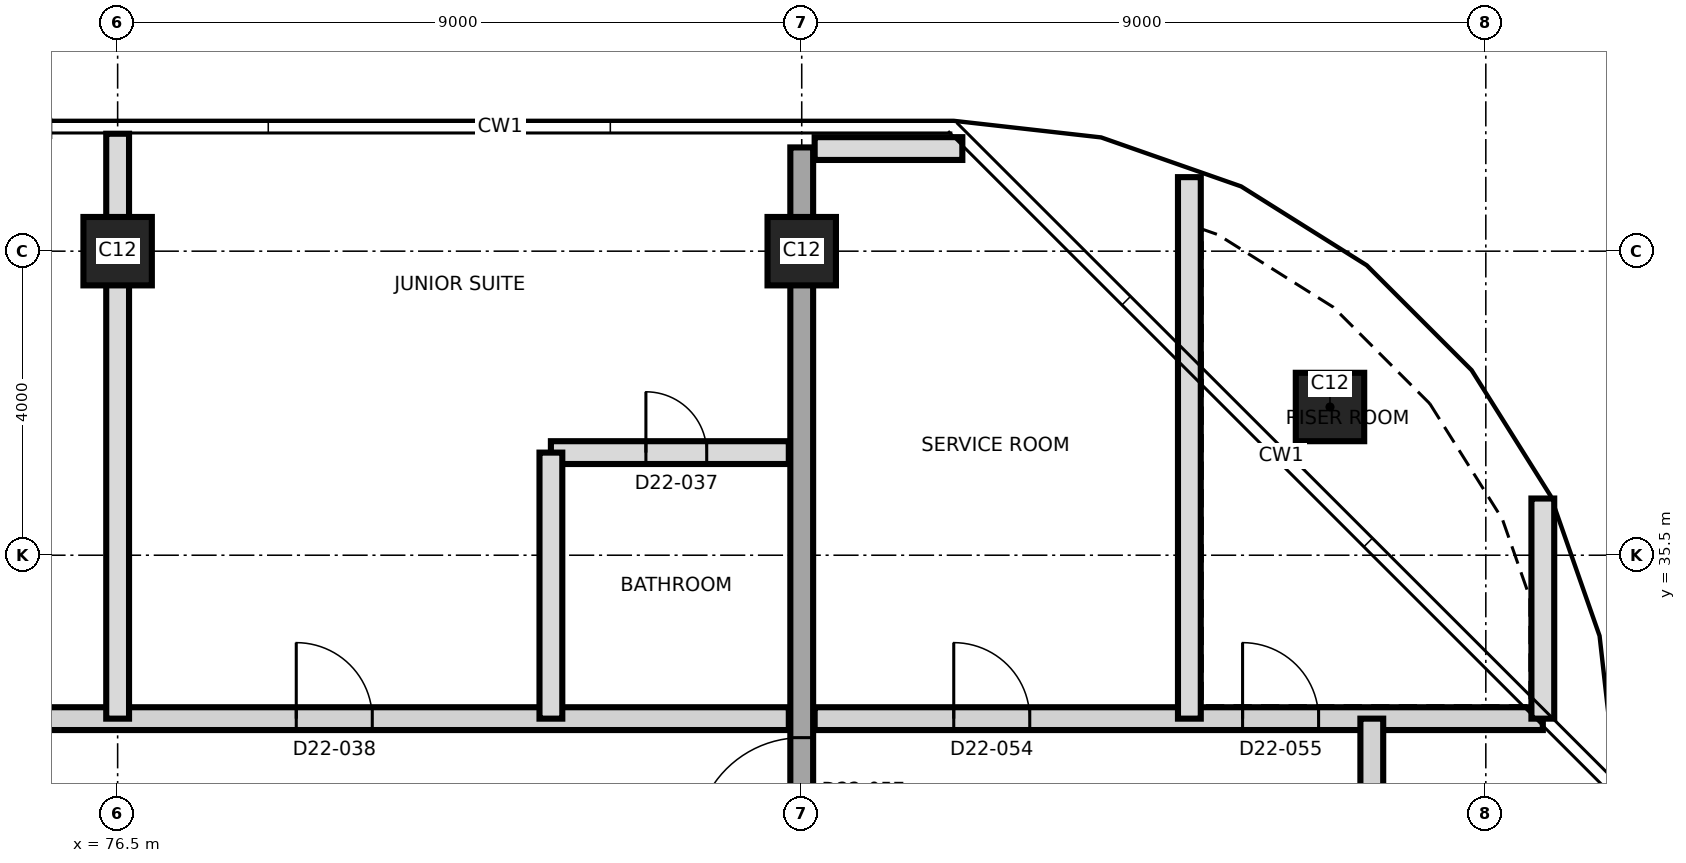
"""IFC4 building model, lengths in metres.
Left out: names, types, materials, properties, quantities, classifications, styles, units other than length and angle.
Written with IfcOpenShell. Run it as: python <this file> out.ifc"""

import sys

from ifc_helpers import new_model, si_unit, direction, frame, frame_2d, origin, origin_2d, place, context, subcontext, project, spatial, rectangle, extrude, element, fill, save


model = new_model("IFC4")
c1 = context("Model", 3, precision=1e-05, world=origin(), true_north=direction((0.0, 1.0)))
c2 = subcontext(c1, "Body", "Model", "MODEL_VIEW")
j1 = project(units=[si_unit("LENGTHUNIT", "METRE"), si_unit("PLANEANGLEUNIT", "RADIAN")], contexts=[c1])
p1 = place(None, origin())
s1 = spatial("IfcSite", under=j1, at=p1, CompositionType="ELEMENT")
p2 = place(p1, origin())
s2 = spatial("IfcBuilding", under=s1, at=p2, CompositionType="ELEMENT")
p3 = place(p2, frame((0.0, 0.0, 199.5)))
s3 = spatial("IfcBuildingStorey", under=s2, at=p3, CompositionType="ELEMENT", Elevation=199.5)
for number, where, z_axis, x_axis in (
    (1, (92.45, 37.45, 0.0), (0.0, 0.0, 1.0), (1.0, 0.0, 0.0)),
    (2, (76.5, 39.5, 0.0), (0.0, 0.0, 1.0), (1.0, 0.0, 0.0)),
    (3, (85.5, 39.5, 0.0), (0.0, 0.0, 1.0), (1.0, 0.0, 0.0)),
):
    element("IfcColumn", number, at=place(p3, frame(where, z_axis=z_axis, x_axis=x_axis)), inside=s3, PredefinedType="COLUMN", context=c2, shape_type="SweptSolid", body=[
        extrude(rectangle(XDim=0.9, YDim=0.9, at=origin_2d()), origin(), (0.0, 0.0, 1.0), 3.7),
    ])
p4 = place(p3, frame((85.5, 20.135, 0.0), z_axis=(0.0, 0.0, 1.0), x_axis=(0.0, 1.0, 0.0)))
e4 = element("IfcWall", 4, at=p4, inside=s3, PredefinedType="SHEAR", context=c2, shape_type="SweptSolid", body=[
    extrude(rectangle(XDim=20.73, YDim=0.3, at=frame_2d((10.365, 0.0))), origin(), (0.0, 0.0, 1.0), 3.7),
])
p5 = place(p4, frame((11.565, 0.0, 0.0)))
e5 = element("IfcOpeningElement", 5, at=p5, cuts=e4, PredefinedType="OPENING", context=c2, shape_type="SweptSolid", body=[
    extrude(rectangle(XDim=1.4, YDim=2.1, at=frame_2d((0.7, 1.05))), frame((0.0, 0.16, 0.0), z_axis=(0.0, -1.0, 0.0), x_axis=(1.0, 0.0, 0.0)), (0.0, 0.0, 1.0), 0.32),
])
p6 = place(p3, frame((58.55, 33.35, 0.0), z_axis=(0.0, 0.0, 1.0), x_axis=(1.0, 0.0, 0.0)))
e6 = element("IfcWall", 6, at=p6, inside=s3, PredefinedType="PARTITIONING", context=c2, shape_type="SweptSolid", body=[
    extrude(rectangle(XDim=26.78, YDim=0.3, at=frame_2d((13.39, 0.0))), origin(), (0.0, 0.0, 1.0), 3.4),
])
p7 = place(p6, frame((1.1, 0.0, 0.0)))
e7 = element("IfcOpeningElement", 7, at=p7, cuts=e6, PredefinedType="OPENING", context=c2, shape_type="SweptSolid", body=[
    extrude(rectangle(XDim=1.0, YDim=2.1, at=frame_2d((0.5, 1.05))), frame((0.0, 0.16, 0.0), z_axis=(0.0, -1.0, 0.0), x_axis=(1.0, 0.0, 0.0)), (0.0, 0.0, 1.0), 0.32),
])
p8 = place(p6, frame((6.95, 0.0, 0.0)))
e8 = element("IfcOpeningElement", 8, at=p8, cuts=e6, PredefinedType="OPENING", context=c2, shape_type="SweptSolid", body=[
    extrude(rectangle(XDim=1.0, YDim=2.1, at=frame_2d((0.5, 1.05))), frame((0.0, 0.16, 0.0), z_axis=(0.0, -1.0, 0.0), x_axis=(1.0, 0.0, 0.0)), (0.0, 0.0, 1.0), 0.32),
])
p9 = place(p6, frame((14.6, 0.0, 0.0)))
e9 = element("IfcOpeningElement", 9, at=p9, cuts=e6, PredefinedType="OPENING", context=c2, shape_type="SweptSolid", body=[
    extrude(rectangle(XDim=1.0, YDim=2.4, at=frame_2d((0.5, 1.2))), frame((0.0, 0.16, 0.0), z_axis=(0.0, -1.0, 0.0), x_axis=(1.0, 0.0, 0.0)), (0.0, 0.0, 1.0), 0.32),
])
p10 = place(p6, frame((20.3, 0.0, 0.0)))
e10 = element("IfcOpeningElement", 10, at=p10, cuts=e6, PredefinedType="OPENING", context=c2, shape_type="SweptSolid", body=[
    extrude(rectangle(XDim=1.0, YDim=2.4, at=frame_2d((0.5, 1.2))), frame((0.0, 0.16, 0.0), z_axis=(0.0, -1.0, 0.0), x_axis=(1.0, 0.0, 0.0)), (0.0, 0.0, 1.0), 0.32),
])
p11 = place(p3, frame((85.67, 33.35, 0.0), z_axis=(0.0, 0.0, 1.0), x_axis=(1.0, 0.0, 0.0)))
e11 = element("IfcWall", 11, at=p11, inside=s3, PredefinedType="PARTITIONING", context=c2, shape_type="SweptSolid", body=[
    extrude(rectangle(XDim=9.58, YDim=0.3, at=frame_2d((4.79, 0.0))), origin(), (0.0, 0.0, 1.0), 3.4),
])
p12 = place(p11, frame((1.83, 0.0, 0.0)))
e12 = element("IfcOpeningElement", 12, at=p12, cuts=e11, PredefinedType="OPENING", context=c2, shape_type="SweptSolid", body=[
    extrude(rectangle(XDim=1.0, YDim=2.1, at=frame_2d((0.5, 1.05))), frame((0.0, 0.16, 0.0), z_axis=(0.0, -1.0, 0.0), x_axis=(1.0, 0.0, 0.0)), (0.0, 0.0, 1.0), 0.32),
])
p13 = place(p11, frame((5.63, 0.0, 0.0)))
e13 = element("IfcOpeningElement", 13, at=p13, cuts=e11, PredefinedType="OPENING", context=c2, shape_type="SweptSolid", body=[
    extrude(rectangle(XDim=1.0, YDim=2.1, at=frame_2d((0.5, 1.05))), frame((0.0, 0.16, 0.0), z_axis=(0.0, -1.0, 0.0), x_axis=(1.0, 0.0, 0.0)), (0.0, 0.0, 1.0), 0.32),
])
p14 = place(p3, frame((82.2, 36.85, 0.0), z_axis=(0.0, 0.0, 1.0), x_axis=(1.0, 0.0, 0.0)))
e14 = element("IfcWall", 14, at=p14, inside=s3, PredefinedType="PARTITIONING", context=c2, shape_type="SweptSolid", body=[
    extrude(rectangle(XDim=3.13, YDim=0.3, at=frame_2d((1.565, 0.0))), origin(), (0.0, 0.0, 1.0), 3.4),
])
p15 = place(p14, frame((1.25, 0.0, 0.0)))
e15 = element("IfcOpeningElement", 15, at=p15, cuts=e14, PredefinedType="OPENING", context=c2, shape_type="SweptSolid", body=[
    extrude(rectangle(XDim=0.8, YDim=2.1, at=frame_2d((0.4, 1.05))), frame((0.0, 0.16, 0.0), z_axis=(0.0, -1.0, 0.0), x_axis=(1.0, 0.0, 0.0)), (0.0, 0.0, 1.0), 0.32),
])
p16 = place(p3, frame((85.67, 40.85, 0.0), z_axis=(0.0, 0.0, 1.0), x_axis=(1.0, 0.0, 0.0)))
e16 = element("IfcWall", 16, at=p16, inside=s3, PredefinedType="PARTITIONING", context=c2, shape_type="SweptSolid", body=[
    extrude(rectangle(XDim=1.943, YDim=0.3, at=frame_2d((0.972, 0.0))), origin(), (0.0, 0.0, 1.0), 3.4),
])
p17 = place(p3, frame((76.5, 33.35, 0.0), z_axis=(0.0, 0.0, 1.0), x_axis=(0.0, 1.0, 0.0)))
e17 = element("IfcWall", 17, at=p17, inside=s3, PredefinedType="PARTITIONING", context=c2, shape_type="SweptSolid", body=[
    extrude(rectangle(XDim=7.695, YDim=0.3, at=frame_2d((3.847, 0.0))), origin(), (0.0, 0.0, 1.0), 3.4),
])
p18 = place(p3, frame((82.2, 33.35, 0.0), z_axis=(0.0, 0.0, 1.0), x_axis=(0.0, 1.0, 0.0)))
e18 = element("IfcWall", 18, at=p18, inside=s3, PredefinedType="PARTITIONING", context=c2, shape_type="SweptSolid", body=[
    extrude(rectangle(XDim=3.5, YDim=0.3, at=frame_2d((1.75, 0.0))), origin(), (0.0, 0.0, 1.0), 3.4),
])
p19 = place(p3, frame((90.6, 33.35, 0.0), z_axis=(0.0, 0.0, 1.0), x_axis=(0.0, 1.0, 0.0)))
e19 = element("IfcWall", 19, at=p19, inside=s3, PredefinedType="PARTITIONING", context=c2, shape_type="SweptSolid", body=[
    extrude(rectangle(XDim=7.124, YDim=0.3, at=frame_2d((3.562, 0.0))), origin(), (0.0, 0.0, 1.0), 3.4),
])
p20 = place(p3, frame((93.0, 30.65, 0.0), z_axis=(0.0, 0.0, 1.0), x_axis=(0.0, 1.0, 0.0)))
e20 = element("IfcWall", 20, at=p20, inside=s3, PredefinedType="PARTITIONING", context=c2, shape_type="SweptSolid", body=[
    extrude(rectangle(XDim=2.7, YDim=0.3, at=frame_2d((1.35, 0.0))), origin(), (0.0, 0.0, 1.0), 3.4),
])
p21 = place(p3, frame((95.25, 33.35, 0.0), z_axis=(0.0, 0.0, 1.0), x_axis=(0.0, 1.0, 0.0)))
e21 = element("IfcWall", 21, at=p21, inside=s3, PredefinedType="PARTITIONING", context=c2, shape_type="SweptSolid", body=[
    extrude(rectangle(XDim=2.896, YDim=0.3, at=frame_2d((1.448, 0.0))), origin(), (0.0, 0.0, 1.0), 3.4),
])
p22 = place(p15, origin())
e22 = element("IfcDoor", 22, at=p22, inside=s3, OperationType="SINGLE_SWING_LEFT", PredefinedType="DOOR", context=c2, shape_type="SweptSolid", body=[
    extrude(rectangle(XDim=0.8, YDim=2.1, at=frame_2d((0.4, 1.05))), frame((0.0, 0.025, 0.0), z_axis=(0.0, -1.0, 0.0), x_axis=(1.0, 0.0, 0.0)), (0.0, 0.0, 1.0), 0.05),
])
fill(e15, e22)
p23 = place(p10, origin())
e23 = element("IfcDoor", 23, at=p23, inside=s3, OperationType="SINGLE_SWING_RIGHT", PredefinedType="DOOR", context=c2, shape_type="SweptSolid", body=[
    extrude(rectangle(XDim=1.0, YDim=2.4, at=frame_2d((0.5, 1.2))), frame((0.0, 0.025, 0.0), z_axis=(0.0, -1.0, 0.0), x_axis=(1.0, 0.0, 0.0)), (0.0, 0.0, 1.0), 0.05),
])
fill(e10, e23)
p24 = place(p12, origin())
e24 = element("IfcDoor", 24, at=p24, inside=s3, OperationType="SINGLE_SWING_LEFT", PredefinedType="DOOR", context=c2, shape_type="SweptSolid", body=[
    extrude(rectangle(XDim=1.0, YDim=2.1, at=frame_2d((0.5, 1.05))), frame((0.0, 0.025, 0.0), z_axis=(0.0, -1.0, 0.0), x_axis=(1.0, 0.0, 0.0)), (0.0, 0.0, 1.0), 0.05),
])
fill(e12, e24)
p25 = place(p13, origin())
e25 = element("IfcDoor", 25, at=p25, inside=s3, OperationType="SINGLE_SWING_RIGHT", PredefinedType="DOOR", context=c2, shape_type="SweptSolid", body=[
    extrude(rectangle(XDim=1.0, YDim=2.1, at=frame_2d((0.5, 1.05))), frame((0.0, 0.025, 0.0), z_axis=(0.0, -1.0, 0.0), x_axis=(1.0, 0.0, 0.0)), (0.0, 0.0, 1.0), 0.05),
])
fill(e13, e25)
p26 = place(p5, origin())
e26 = element("IfcDoor", 26, at=p26, inside=s3, OperationType="SINGLE_SWING_RIGHT", PredefinedType="DOOR", context=c2, shape_type="SweptSolid", body=[
    extrude(rectangle(XDim=1.4, YDim=2.1, at=frame_2d((0.7, 1.05))), frame((0.0, 0.025, 0.0), z_axis=(0.0, -1.0, 0.0), x_axis=(1.0, 0.0, 0.0)), (0.0, 0.0, 1.0), 0.05),
])
fill(e5, e26)
save(model, sys.argv[1])
